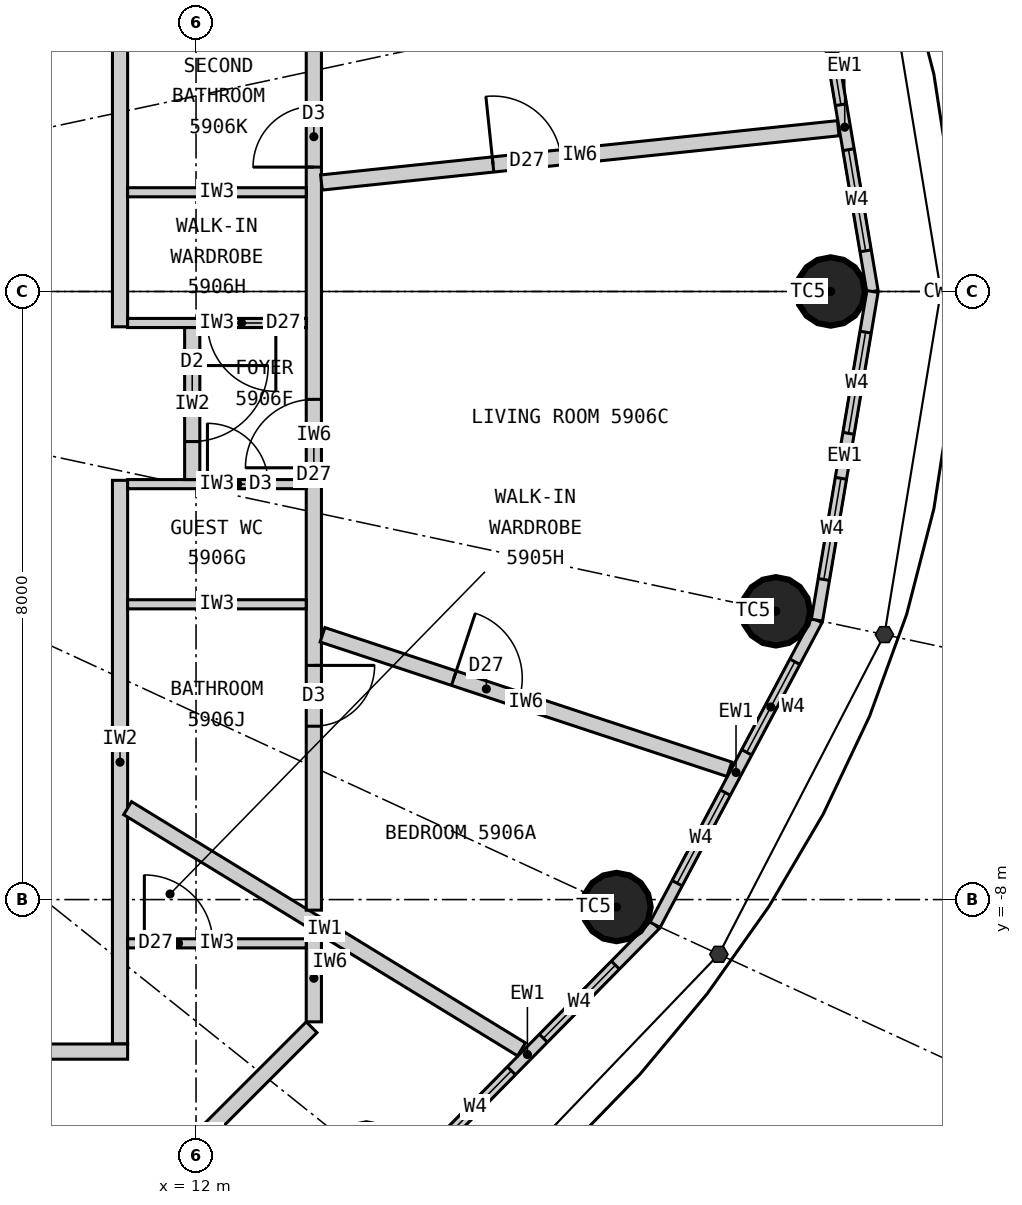
"""IFC4 building model, lengths in metres.
Left out: names, types, materials, properties, quantities, classifications, styles, units other than length and angle.
Written with IfcOpenShell. Run it as: python <this file> out.ifc"""

import sys

from ifc_helpers import new_model, si_unit, direction, frame, frame_2d, origin, origin_2d, place, context, subcontext, project, spatial, rectangle, circle, extrude, element, fill, save


model = new_model("IFC4")
c1 = context("Model", 3, precision=1e-05, world=origin(), true_north=direction((0.0, 1.0)))
c2 = subcontext(c1, "Body", "Model", "MODEL_VIEW")
j1 = project(units=[si_unit("LENGTHUNIT", "METRE"), si_unit("PLANEANGLEUNIT", "RADIAN")], contexts=[c1])
p1 = place(None, origin())
s1 = spatial("IfcSite", under=j1, at=p1, CompositionType="ELEMENT")
p2 = place(p1, origin())
s2 = spatial("IfcBuilding", under=s1, at=p2, CompositionType="ELEMENT")
p3 = place(p2, frame((0.0, 0.0, 219.3)))
s3 = spatial("IfcBuildingStorey", under=s2, at=p3, CompositionType="ELEMENT", Elevation=219.3)
for number, where, z_axis, x_axis in (
    (1, (20.35, 0.0, 0.0), (0.0, 0.0, 1.0), (1.0, 0.0, 0.0)),
    (2, (14.241, -11.393, 0.0), (0.0, 0.0, 1.0), (1.0, 0.0, 0.0)),
    (3, (17.532, -8.098, 0.0), (0.0, 0.0, 1.0), (1.0, 0.0, 0.0)),
    (4, (19.629, -4.208, 0.0), (0.0, 0.0, 1.0), (1.0, 0.0, 0.0)),
):
    element("IfcColumn", number, at=place(p3, frame(where, z_axis=z_axis, x_axis=x_axis)), inside=s3, PredefinedType="COLUMN", context=c2, shape_type="SweptSolid", body=[
        extrude(circle(Radius=0.45, at=origin_2d()), origin(), (0.0, 0.0, 1.0), 3.3),
    ])
p4 = place(p3, frame((20.9, 0.0, 0.0), z_axis=(0.0, 0.0, 1.0), x_axis=(-0.166538513568, 0.986034950445, 0.0)))
e5 = element("IfcWall", 5, at=p4, inside=s3, PredefinedType="ELEMENTEDWALL", context=c2, shape_type="SweptSolid", body=[
    extrude(rectangle(XDim=4.385, YDim=0.15, at=frame_2d((2.192, 0.0))), origin(), (0.0, 0.0, 1.0), 3.12),
])
p5 = place(p4, frame((0.542, 0.0, 0.9)))
e6 = element("IfcOpeningElement", 6, at=p5, cuts=e5, PredefinedType="OPENING", context=c2, shape_type="SweptSolid", body=[
    extrude(rectangle(XDim=1.35, YDim=1.9, at=frame_2d((0.675, 0.95))), frame((0.0, 0.085, 0.0), z_axis=(0.0, -1.0, 0.0), x_axis=(1.0, 0.0, 0.0)), (0.0, 0.0, 1.0), 0.17),
])
p6 = place(p4, frame((2.492, 0.0, 0.9)))
e7 = element("IfcOpeningElement", 7, at=p6, cuts=e5, PredefinedType="OPENING", context=c2, shape_type="SweptSolid", body=[
    extrude(rectangle(XDim=1.35, YDim=1.9, at=frame_2d((0.675, 0.95))), frame((0.0, 0.085, 0.0), z_axis=(0.0, -1.0, 0.0), x_axis=(1.0, 0.0, 0.0)), (0.0, 0.0, 1.0), 0.17),
])
p7 = place(p3, frame((14.68, -11.744, 0.0), z_axis=(0.0, 0.0, 1.0), x_axis=(0.701527379618, 0.712642501993, 0.0)))
e8 = element("IfcWall", 8, at=p7, inside=s3, PredefinedType="ELEMENTEDWALL", context=c2, shape_type="SweptSolid", body=[
    extrude(rectangle(XDim=4.788, YDim=0.15, at=frame_2d((2.394, 0.0))), origin(), (0.0, 0.0, 1.0), 3.12),
])
p8 = place(p7, frame((0.744, 0.0, 0.9)))
e9 = element("IfcOpeningElement", 9, at=p8, cuts=e8, PredefinedType="OPENING", context=c2, shape_type="SweptSolid", body=[
    extrude(rectangle(XDim=1.35, YDim=1.9, at=frame_2d((0.675, 0.95))), frame((0.0, 0.085, 0.0), z_axis=(0.0, -1.0, 0.0), x_axis=(1.0, 0.0, 0.0)), (0.0, 0.0, 1.0), 0.17),
])
p9 = place(p7, frame((2.694, 0.0, 0.9)))
e10 = element("IfcOpeningElement", 10, at=p9, cuts=e8, PredefinedType="OPENING", context=c2, shape_type="SweptSolid", body=[
    extrude(rectangle(XDim=1.35, YDim=1.9, at=frame_2d((0.675, 0.95))), frame((0.0, 0.085, 0.0), z_axis=(0.0, -1.0, 0.0), x_axis=(1.0, 0.0, 0.0)), (0.0, 0.0, 1.0), 0.17),
])
p10 = place(p3, frame((18.04, -8.332, 0.0), z_axis=(0.0, 0.0, 1.0), x_axis=(0.469256152955, 0.883062094597, 0.0)))
e11 = element("IfcWall", 11, at=p10, inside=s3, PredefinedType="ELEMENTEDWALL", context=c2, shape_type="SweptSolid", body=[
    extrude(rectangle(XDim=4.539, YDim=0.15, at=frame_2d((2.27, 0.0))), origin(), (0.0, 0.0, 1.0), 3.12),
])
p11 = place(p10, frame((0.62, 0.0, 0.9)))
e12 = element("IfcOpeningElement", 12, at=p11, cuts=e11, PredefinedType="OPENING", context=c2, shape_type="SweptSolid", body=[
    extrude(rectangle(XDim=1.35, YDim=1.9, at=frame_2d((0.675, 0.95))), frame((0.0, 0.085, 0.0), z_axis=(0.0, -1.0, 0.0), x_axis=(1.0, 0.0, 0.0)), (0.0, 0.0, 1.0), 0.17),
])
p12 = place(p10, frame((2.57, 0.0, 0.9)))
e13 = element("IfcOpeningElement", 13, at=p12, cuts=e11, PredefinedType="OPENING", context=c2, shape_type="SweptSolid", body=[
    extrude(rectangle(XDim=1.35, YDim=1.9, at=frame_2d((0.675, 0.95))), frame((0.0, 0.085, 0.0), z_axis=(0.0, -1.0, 0.0), x_axis=(1.0, 0.0, 0.0)), (0.0, 0.0, 1.0), 0.17),
])
p13 = place(p3, frame((20.17, -4.323, 0.0), z_axis=(0.0, 0.0, 1.0), x_axis=(0.166538513568, 0.986034950445, 0.0)))
e14 = element("IfcWall", 14, at=p13, inside=s3, PredefinedType="ELEMENTEDWALL", context=c2, shape_type="SweptSolid", body=[
    extrude(rectangle(XDim=4.385, YDim=0.15, at=frame_2d((2.192, 0.0))), origin(), (0.0, 0.0, 1.0), 3.12),
])
p14 = place(p13, frame((0.542, 0.0, 0.9)))
e15 = element("IfcOpeningElement", 15, at=p14, cuts=e14, PredefinedType="OPENING", context=c2, shape_type="SweptSolid", body=[
    extrude(rectangle(XDim=1.35, YDim=1.9, at=frame_2d((0.675, 0.95))), frame((0.0, 0.085, 0.0), z_axis=(0.0, -1.0, 0.0), x_axis=(1.0, 0.0, 0.0)), (0.0, 0.0, 1.0), 0.17),
])
p15 = place(p13, frame((2.492, 0.0, 0.9)))
e16 = element("IfcOpeningElement", 16, at=p15, cuts=e14, PredefinedType="OPENING", context=c2, shape_type="SweptSolid", body=[
    extrude(rectangle(XDim=1.35, YDim=1.9, at=frame_2d((0.675, 0.95))), frame((0.0, 0.085, 0.0), z_axis=(0.0, -1.0, 0.0), x_axis=(1.0, 0.0, 0.0)), (0.0, 0.0, 1.0), 0.17),
])
p16 = place(p3, frame((11.0, -9.9, 0.0), z_axis=(0.0, 0.0, 1.0), x_axis=(0.0, 1.0, 0.0)))
e17 = element("IfcWall", 17, at=p16, inside=s3, PredefinedType="PARTITIONING", context=c2, shape_type="SweptSolid", body=[
    extrude(rectangle(XDim=7.416, YDim=0.2, at=frame_2d((3.708, 0.0))), origin(), (0.0, 0.0, 1.0), 3.12),
])
p17 = place(p3, frame((11.0, -0.464, 0.0), z_axis=(0.0, 0.0, 1.0), x_axis=(0.0, 1.0, 0.0)))
e18 = element("IfcWall", 18, at=p17, inside=s3, PredefinedType="PARTITIONING", context=c2, shape_type="SweptSolid", body=[
    extrude(rectangle(XDim=10.364, YDim=0.2, at=frame_2d((5.182, 0.0))), origin(), (0.0, 0.0, 1.0), 3.12),
])
p18 = place(p3, frame((11.1, -10.0, 0.0), z_axis=(0.0, 0.0, 1.0), x_axis=(-1.0, 0.0, 0.0)))
e19 = element("IfcWall", 19, at=p18, inside=s3, PredefinedType="PARTITIONING", context=c2, shape_type="SweptSolid", body=[
    extrude(rectangle(XDim=22.2, YDim=0.2, at=frame_2d((11.1, 0.0))), origin(), (0.0, 0.0, 1.0), 3.12),
])
p19 = place(p18, frame((18.864, 0.0, 0.0)))
e20 = element("IfcOpeningElement", 20, at=p19, cuts=e19, PredefinedType="OPENING", context=c2, shape_type="SweptSolid", body=[
    extrude(rectangle(XDim=1.0, YDim=2.2, at=frame_2d((0.5, 1.1))), frame((0.0, 0.11, 0.0), z_axis=(0.0, -1.0, 0.0), x_axis=(1.0, 0.0, 0.0)), (0.0, 0.0, 1.0), 0.22),
])
p20 = place(p18, frame((2.309, 0.0, 0.0)))
e21 = element("IfcOpeningElement", 21, at=p20, cuts=e19, PredefinedType="OPENING", context=c2, shape_type="SweptSolid", body=[
    extrude(rectangle(XDim=1.0, YDim=2.2, at=frame_2d((0.5, 1.1))), frame((0.0, 0.11, 0.0), z_axis=(0.0, -1.0, 0.0), x_axis=(1.0, 0.0, 0.0)), (0.0, 0.0, 1.0), 0.22),
])
p21 = place(p3, frame((11.1, -6.797, 0.0), z_axis=(0.0, 0.0, 1.0), x_axis=(0.852799818179, -0.522237943963, 0.0)))
e22 = element("IfcWall", 22, at=p21, inside=s3, PredefinedType="PARTITIONING", context=c2, shape_type="SweptSolid", body=[
    extrude(rectangle(XDim=6.077, YDim=0.2, at=frame_2d((3.039, 0.0))), origin(), (0.0, 0.0, 1.0), 3.12),
])
p22 = place(p3, frame((10.679, -12.521, 0.0), z_axis=(0.0, 0.0, 1.0), x_axis=(0.707106781187, 0.707106781187, 0.0)))
e23 = element("IfcWall", 23, at=p22, inside=s3, PredefinedType="PARTITIONING", context=c2, shape_type="SweptSolid", body=[
    extrude(rectangle(XDim=4.019, YDim=0.2, at=frame_2d((2.009, 0.0))), origin(), (0.0, 0.0, 1.0), 3.12),
])
p23 = place(p3, frame((13.55, -9.609, 0.0), z_axis=(0.0, 0.0, 1.0), x_axis=(0.0, 1.0, 0.0)))
e24 = element("IfcWall", 24, at=p23, inside=s3, PredefinedType="PARTITIONING", context=c2, shape_type="SweptSolid", body=[
    extrude(rectangle(XDim=1.148, YDim=0.2, at=frame_2d((0.574, 0.0))), origin(), (0.0, 0.0, 1.0), 3.12),
])
p24 = place(p3, frame((11.1, -8.576, 0.0), z_axis=(0.0, 0.0, 1.0), x_axis=(1.0, 0.0, 0.0)))
e25 = element("IfcWall", 25, at=p24, inside=s3, PredefinedType="PARTITIONING", context=c2, shape_type="SweptSolid", body=[
    extrude(rectangle(XDim=2.35, YDim=0.12, at=frame_2d((1.175, 0.0))), origin(), (0.0, 0.0, 1.0), 3.12),
])
p25 = place(p24, frame((0.22, 0.0, 0.0)))
e26 = element("IfcOpeningElement", 26, at=p25, cuts=e25, PredefinedType="OPENING", context=c2, shape_type="SweptSolid", body=[
    extrude(rectangle(XDim=0.9, YDim=2.1, at=frame_2d((0.45, 1.05))), frame((0.0, 0.07, 0.0), z_axis=(0.0, -1.0, 0.0), x_axis=(1.0, 0.0, 0.0)), (0.0, 0.0, 1.0), 0.14),
])
p26 = place(p3, frame((13.55, -8.139, 0.0), z_axis=(0.0, 0.0, 1.0), x_axis=(0.0, 1.0, 0.0)))
e27 = element("IfcWall", 27, at=p26, inside=s3, PredefinedType="PARTITIONING", context=c2, shape_type="SweptSolid", body=[
    extrude(rectangle(XDim=12.496, YDim=0.2, at=frame_2d((6.248, 0.0))), origin(), (0.0, 0.0, 1.0), 3.12),
])
p27 = place(p26, frame((2.42, 0.0, 0.0)))
e28 = element("IfcOpeningElement", 28, at=p27, cuts=e27, PredefinedType="OPENING", context=c2, shape_type="SweptSolid", body=[
    extrude(rectangle(XDim=0.8, YDim=2.1, at=frame_2d((0.4, 1.05))), frame((0.0, 0.11, 0.0), z_axis=(0.0, -1.0, 0.0), x_axis=(1.0, 0.0, 0.0)), (0.0, 0.0, 1.0), 0.22),
])
p28 = place(p26, frame((9.776, 0.0, 0.0)))
e29 = element("IfcOpeningElement", 29, at=p28, cuts=e27, PredefinedType="OPENING", context=c2, shape_type="SweptSolid", body=[
    extrude(rectangle(XDim=0.8, YDim=2.1, at=frame_2d((0.4, 1.05))), frame((0.0, 0.11, 0.0), z_axis=(0.0, -1.0, 0.0), x_axis=(1.0, 0.0, 0.0)), (0.0, 0.0, 1.0), 0.22),
])
p29 = place(p26, frame((5.82, 0.0, 0.0)))
e30 = element("IfcOpeningElement", 30, at=p29, cuts=e27, PredefinedType="OPENING", context=c2, shape_type="SweptSolid", body=[
    extrude(rectangle(XDim=0.9, YDim=2.1, at=frame_2d((0.45, 1.05))), frame((0.0, 0.11, 0.0), z_axis=(0.0, -1.0, 0.0), x_axis=(1.0, 0.0, 0.0)), (0.0, 0.0, 1.0), 0.22),
])
p30 = place(p3, frame((13.664, -4.516, 0.0), z_axis=(0.0, 0.0, 1.0), x_axis=(0.949481375941, -0.313823384632, 0.0)))
e31 = element("IfcWall", 31, at=p30, inside=s3, PredefinedType="PARTITIONING", context=c2, shape_type="SweptSolid", body=[
    extrude(rectangle(XDim=5.638, YDim=0.2, at=frame_2d((2.819, 0.0))), origin(), (0.0, 0.0, 1.0), 3.12),
])
p31 = place(p30, frame((1.82, 0.0, 0.0)))
e32 = element("IfcOpeningElement", 32, at=p31, cuts=e31, PredefinedType="OPENING", context=c2, shape_type="SweptSolid", body=[
    extrude(rectangle(XDim=0.9, YDim=2.1, at=frame_2d((0.45, 1.05))), frame((0.0, 0.11, 0.0), z_axis=(0.0, -1.0, 0.0), x_axis=(1.0, 0.0, 0.0)), (0.0, 0.0, 1.0), 0.22),
])
p32 = place(p3, frame((13.65, 1.434, 0.0), z_axis=(0.0, 0.0, 1.0), x_axis=(0.994526954268, 0.10448031984, 0.0)))
e33 = element("IfcWall", 33, at=p32, inside=s3, PredefinedType="PARTITIONING", context=c2, shape_type="SweptSolid", body=[
    extrude(rectangle(XDim=6.837, YDim=0.2, at=frame_2d((3.418, 0.0))), origin(), (0.0, 0.0, 1.0), 2.47),
])
p33 = place(p32, frame((2.27, 0.0, 0.0)))
e34 = element("IfcOpeningElement", 34, at=p33, cuts=e33, PredefinedType="OPENING", context=c2, shape_type="SweptSolid", body=[
    extrude(rectangle(XDim=0.9, YDim=2.1, at=frame_2d((0.45, 1.05))), frame((0.0, 0.11, 0.0), z_axis=(0.0, -1.0, 0.0), x_axis=(1.0, 0.0, 0.0)), (0.0, 0.0, 1.0), 0.22),
])
p34 = place(p3, frame((11.1, -4.115, 0.0), z_axis=(0.0, 0.0, 1.0), x_axis=(1.0, 0.0, 0.0)))
e35 = element("IfcWall", 35, at=p34, inside=s3, PredefinedType="PARTITIONING", context=c2, shape_type="SweptSolid", body=[
    extrude(rectangle(XDim=2.35, YDim=0.12, at=frame_2d((1.175, 0.0))), origin(), (0.0, 0.0, 1.0), 3.12),
])
p35 = place(p3, frame((11.1, -2.534, 0.0), z_axis=(0.0, 0.0, 1.0), x_axis=(1.0, 0.0, 0.0)))
e36 = element("IfcWall", 36, at=p35, inside=s3, PredefinedType="PARTITIONING", context=c2, shape_type="SweptSolid", body=[
    extrude(rectangle(XDim=2.35, YDim=0.12, at=frame_2d((1.175, 0.0))), origin(), (0.0, 0.0, 1.0), 3.12),
])
p36 = place(p35, frame((1.05, 0.0, 0.0)))
e37 = element("IfcOpeningElement", 37, at=p36, cuts=e36, PredefinedType="OPENING", context=c2, shape_type="SweptSolid", body=[
    extrude(rectangle(XDim=0.8, YDim=2.1, at=frame_2d((0.4, 1.05))), frame((0.0, 0.07, 0.0), z_axis=(0.0, -1.0, 0.0), x_axis=(1.0, 0.0, 0.0)), (0.0, 0.0, 1.0), 0.14),
])
p37 = place(p3, frame((11.1, -0.414, 0.0), z_axis=(0.0, 0.0, 1.0), x_axis=(1.0, 0.0, 0.0)))
e38 = element("IfcWall", 38, at=p37, inside=s3, PredefinedType="PARTITIONING", context=c2, shape_type="SweptSolid", body=[
    extrude(rectangle(XDim=2.35, YDim=0.12, at=frame_2d((1.175, 0.0))), origin(), (0.0, 0.0, 1.0), 3.12),
])
p38 = place(p37, frame((1.05, 0.0, 0.0)))
e39 = element("IfcOpeningElement", 39, at=p38, cuts=e38, PredefinedType="OPENING", context=c2, shape_type="SweptSolid", body=[
    extrude(rectangle(XDim=0.9, YDim=2.1, at=frame_2d((0.45, 1.05))), frame((0.0, 0.07, 0.0), z_axis=(0.0, -1.0, 0.0), x_axis=(1.0, 0.0, 0.0)), (0.0, 0.0, 1.0), 0.14),
])
p39 = place(p3, frame((11.1, 1.306, 0.0), z_axis=(0.0, 0.0, 1.0), x_axis=(1.0, 0.0, 0.0)))
e40 = element("IfcWall", 40, at=p39, inside=s3, PredefinedType="PARTITIONING", context=c2, shape_type="SweptSolid", body=[
    extrude(rectangle(XDim=2.35, YDim=0.12, at=frame_2d((1.175, 0.0))), origin(), (0.0, 0.0, 1.0), 3.12),
])
p40 = place(p3, frame((11.95, -2.474, 0.0), z_axis=(0.0, 0.0, 1.0), x_axis=(0.0, 1.0, 0.0)))
e41 = element("IfcWall", 41, at=p40, inside=s3, PredefinedType="PARTITIONING", context=c2, shape_type="SweptSolid", body=[
    extrude(rectangle(XDim=2.0, YDim=0.2, at=frame_2d((1.0, 0.0))), origin(), (0.0, 0.0, 1.0), 3.12),
])
p41 = place(p40, frame((0.5, 0.0, 0.0)))
e42 = element("IfcOpeningElement", 42, at=p41, cuts=e41, PredefinedType="OPENING", context=c2, shape_type="SweptSolid", body=[
    extrude(rectangle(XDim=1.0, YDim=2.2, at=frame_2d((0.5, 1.1))), frame((0.0, 0.11, 0.0), z_axis=(0.0, -1.0, 0.0), x_axis=(1.0, 0.0, 0.0)), (0.0, 0.0, 1.0), 0.22),
])
p42 = place(p5, origin())
e43 = element("IfcWindow", 43, at=p42, inside=s3, PartitioningType="SINGLE_PANEL", PredefinedType="WINDOW", context=c2, shape_type="SweptSolid", body=[
    extrude(rectangle(XDim=1.35, YDim=1.9, at=frame_2d((0.675, 0.95))), frame((0.0, 0.03, 0.0), z_axis=(0.0, -1.0, 0.0), x_axis=(1.0, 0.0, 0.0)), (0.0, 0.0, 1.0), 0.06),
])
fill(e6, e43)
p43 = place(p6, origin())
e44 = element("IfcWindow", 44, at=p43, inside=s3, PartitioningType="SINGLE_PANEL", PredefinedType="WINDOW", context=c2, shape_type="SweptSolid", body=[
    extrude(rectangle(XDim=1.35, YDim=1.9, at=frame_2d((0.675, 0.95))), frame((0.0, 0.03, 0.0), z_axis=(0.0, -1.0, 0.0), x_axis=(1.0, 0.0, 0.0)), (0.0, 0.0, 1.0), 0.06),
])
fill(e7, e44)
p44 = place(p8, origin())
e45 = element("IfcWindow", 45, at=p44, inside=s3, PartitioningType="SINGLE_PANEL", PredefinedType="WINDOW", context=c2, shape_type="SweptSolid", body=[
    extrude(rectangle(XDim=1.35, YDim=1.9, at=frame_2d((0.675, 0.95))), frame((0.0, 0.03, 0.0), z_axis=(0.0, -1.0, 0.0), x_axis=(1.0, 0.0, 0.0)), (0.0, 0.0, 1.0), 0.06),
])
fill(e9, e45)
p45 = place(p9, origin())
e46 = element("IfcWindow", 46, at=p45, inside=s3, PartitioningType="SINGLE_PANEL", PredefinedType="WINDOW", context=c2, shape_type="SweptSolid", body=[
    extrude(rectangle(XDim=1.35, YDim=1.9, at=frame_2d((0.675, 0.95))), frame((0.0, 0.03, 0.0), z_axis=(0.0, -1.0, 0.0), x_axis=(1.0, 0.0, 0.0)), (0.0, 0.0, 1.0), 0.06),
])
fill(e10, e46)
p46 = place(p11, origin())
e47 = element("IfcWindow", 47, at=p46, inside=s3, PartitioningType="SINGLE_PANEL", PredefinedType="WINDOW", context=c2, shape_type="SweptSolid", body=[
    extrude(rectangle(XDim=1.35, YDim=1.9, at=frame_2d((0.675, 0.95))), frame((0.0, 0.03, 0.0), z_axis=(0.0, -1.0, 0.0), x_axis=(1.0, 0.0, 0.0)), (0.0, 0.0, 1.0), 0.06),
])
fill(e12, e47)
p47 = place(p12, origin())
e48 = element("IfcWindow", 48, at=p47, inside=s3, PartitioningType="SINGLE_PANEL", PredefinedType="WINDOW", context=c2, shape_type="SweptSolid", body=[
    extrude(rectangle(XDim=1.35, YDim=1.9, at=frame_2d((0.675, 0.95))), frame((0.0, 0.03, 0.0), z_axis=(0.0, -1.0, 0.0), x_axis=(1.0, 0.0, 0.0)), (0.0, 0.0, 1.0), 0.06),
])
fill(e13, e48)
p48 = place(p14, origin())
e49 = element("IfcWindow", 49, at=p48, inside=s3, PartitioningType="SINGLE_PANEL", PredefinedType="WINDOW", context=c2, shape_type="SweptSolid", body=[
    extrude(rectangle(XDim=1.35, YDim=1.9, at=frame_2d((0.675, 0.95))), frame((0.0, 0.03, 0.0), z_axis=(0.0, -1.0, 0.0), x_axis=(1.0, 0.0, 0.0)), (0.0, 0.0, 1.0), 0.06),
])
fill(e15, e49)
p49 = place(p15, origin())
e50 = element("IfcWindow", 50, at=p49, inside=s3, PartitioningType="SINGLE_PANEL", PredefinedType="WINDOW", context=c2, shape_type="SweptSolid", body=[
    extrude(rectangle(XDim=1.35, YDim=1.9, at=frame_2d((0.675, 0.95))), frame((0.0, 0.03, 0.0), z_axis=(0.0, -1.0, 0.0), x_axis=(1.0, 0.0, 0.0)), (0.0, 0.0, 1.0), 0.06),
])
fill(e16, e50)
p50 = place(p25, origin())
e51 = element("IfcDoor", 51, at=p50, inside=s3, OperationType="SINGLE_SWING_LEFT", PredefinedType="DOOR", context=c2, shape_type="SweptSolid", body=[
    extrude(rectangle(XDim=0.9, YDim=2.1, at=frame_2d((0.45, 1.05))), frame((0.0, 0.025, 0.0), z_axis=(0.0, -1.0, 0.0), x_axis=(1.0, 0.0, 0.0)), (0.0, 0.0, 1.0), 0.05),
])
fill(e26, e51)
p51 = place(p41, origin())
e52 = element("IfcDoor", 52, at=p51, inside=s3, OperationType="SINGLE_SWING_RIGHT", PredefinedType="DOOR", context=c2, shape_type="SweptSolid", body=[
    extrude(rectangle(XDim=1.0, YDim=2.2, at=frame_2d((0.5, 1.1))), frame((0.0, 0.025, 0.0), z_axis=(0.0, -1.0, 0.0), x_axis=(1.0, 0.0, 0.0)), (0.0, 0.0, 1.0), 0.05),
])
fill(e42, e52)
p52 = place(p27, origin())
e53 = element("IfcDoor", 53, at=p52, inside=s3, OperationType="SINGLE_SWING_RIGHT", PredefinedType="DOOR", context=c2, shape_type="SweptSolid", body=[
    extrude(rectangle(XDim=0.8, YDim=2.1, at=frame_2d((0.4, 1.05))), frame((0.0, 0.025, 0.0), z_axis=(0.0, -1.0, 0.0), x_axis=(1.0, 0.0, 0.0)), (0.0, 0.0, 1.0), 0.05),
])
fill(e28, e53)
p53 = place(p36, origin())
e54 = element("IfcDoor", 54, at=p53, inside=s3, OperationType="SINGLE_SWING_LEFT", PredefinedType="DOOR", context=c2, shape_type="SweptSolid", body=[
    extrude(rectangle(XDim=0.8, YDim=2.1, at=frame_2d((0.4, 1.05))), frame((0.0, 0.025, 0.0), z_axis=(0.0, -1.0, 0.0), x_axis=(1.0, 0.0, 0.0)), (0.0, 0.0, 1.0), 0.05),
])
fill(e37, e54)
p54 = place(p38, origin())
e55 = element("IfcDoor", 55, at=p54, inside=s3, OperationType="SINGLE_SWING_RIGHT", PredefinedType="DOOR", context=c2, shape_type="SweptSolid", body=[
    extrude(rectangle(XDim=0.9, YDim=2.1, at=frame_2d((0.45, 1.05))), frame((0.0, 0.025, 0.0), z_axis=(0.0, -1.0, 0.0), x_axis=(1.0, 0.0, 0.0)), (0.0, 0.0, 1.0), 0.05),
])
fill(e39, e55)
p55 = place(p28, origin())
e56 = element("IfcDoor", 56, at=p55, inside=s3, OperationType="SINGLE_SWING_LEFT", PredefinedType="DOOR", context=c2, shape_type="SweptSolid", body=[
    extrude(rectangle(XDim=0.8, YDim=2.1, at=frame_2d((0.4, 1.05))), frame((0.0, 0.025, 0.0), z_axis=(0.0, -1.0, 0.0), x_axis=(1.0, 0.0, 0.0)), (0.0, 0.0, 1.0), 0.05),
])
fill(e29, e56)
p56 = place(p29, origin())
e57 = element("IfcDoor", 57, at=p56, inside=s3, OperationType="SINGLE_SWING_LEFT", PredefinedType="DOOR", context=c2, shape_type="SweptSolid", body=[
    extrude(rectangle(XDim=0.9, YDim=2.1, at=frame_2d((0.45, 1.05))), frame((0.0, 0.025, 0.0), z_axis=(0.0, -1.0, 0.0), x_axis=(1.0, 0.0, 0.0)), (0.0, 0.0, 1.0), 0.05),
])
fill(e30, e57)
p57 = place(p31, origin())
e58 = element("IfcDoor", 58, at=p57, inside=s3, OperationType="SINGLE_SWING_LEFT", PredefinedType="DOOR", context=c2, shape_type="SweptSolid", body=[
    extrude(rectangle(XDim=0.9, YDim=2.1, at=frame_2d((0.45, 1.05))), frame((0.0, 0.025, 0.0), z_axis=(0.0, -1.0, 0.0), x_axis=(1.0, 0.0, 0.0)), (0.0, 0.0, 1.0), 0.05),
])
fill(e32, e58)
p58 = place(p33, origin())
e59 = element("IfcDoor", 59, at=p58, inside=s3, OperationType="SINGLE_SWING_LEFT", PredefinedType="DOOR", context=c2, shape_type="SweptSolid", body=[
    extrude(rectangle(XDim=0.9, YDim=2.1, at=frame_2d((0.45, 1.05))), frame((0.0, 0.025, 0.0), z_axis=(0.0, -1.0, 0.0), x_axis=(1.0, 0.0, 0.0)), (0.0, 0.0, 1.0), 0.05),
])
fill(e34, e59)
save(model, sys.argv[1])
